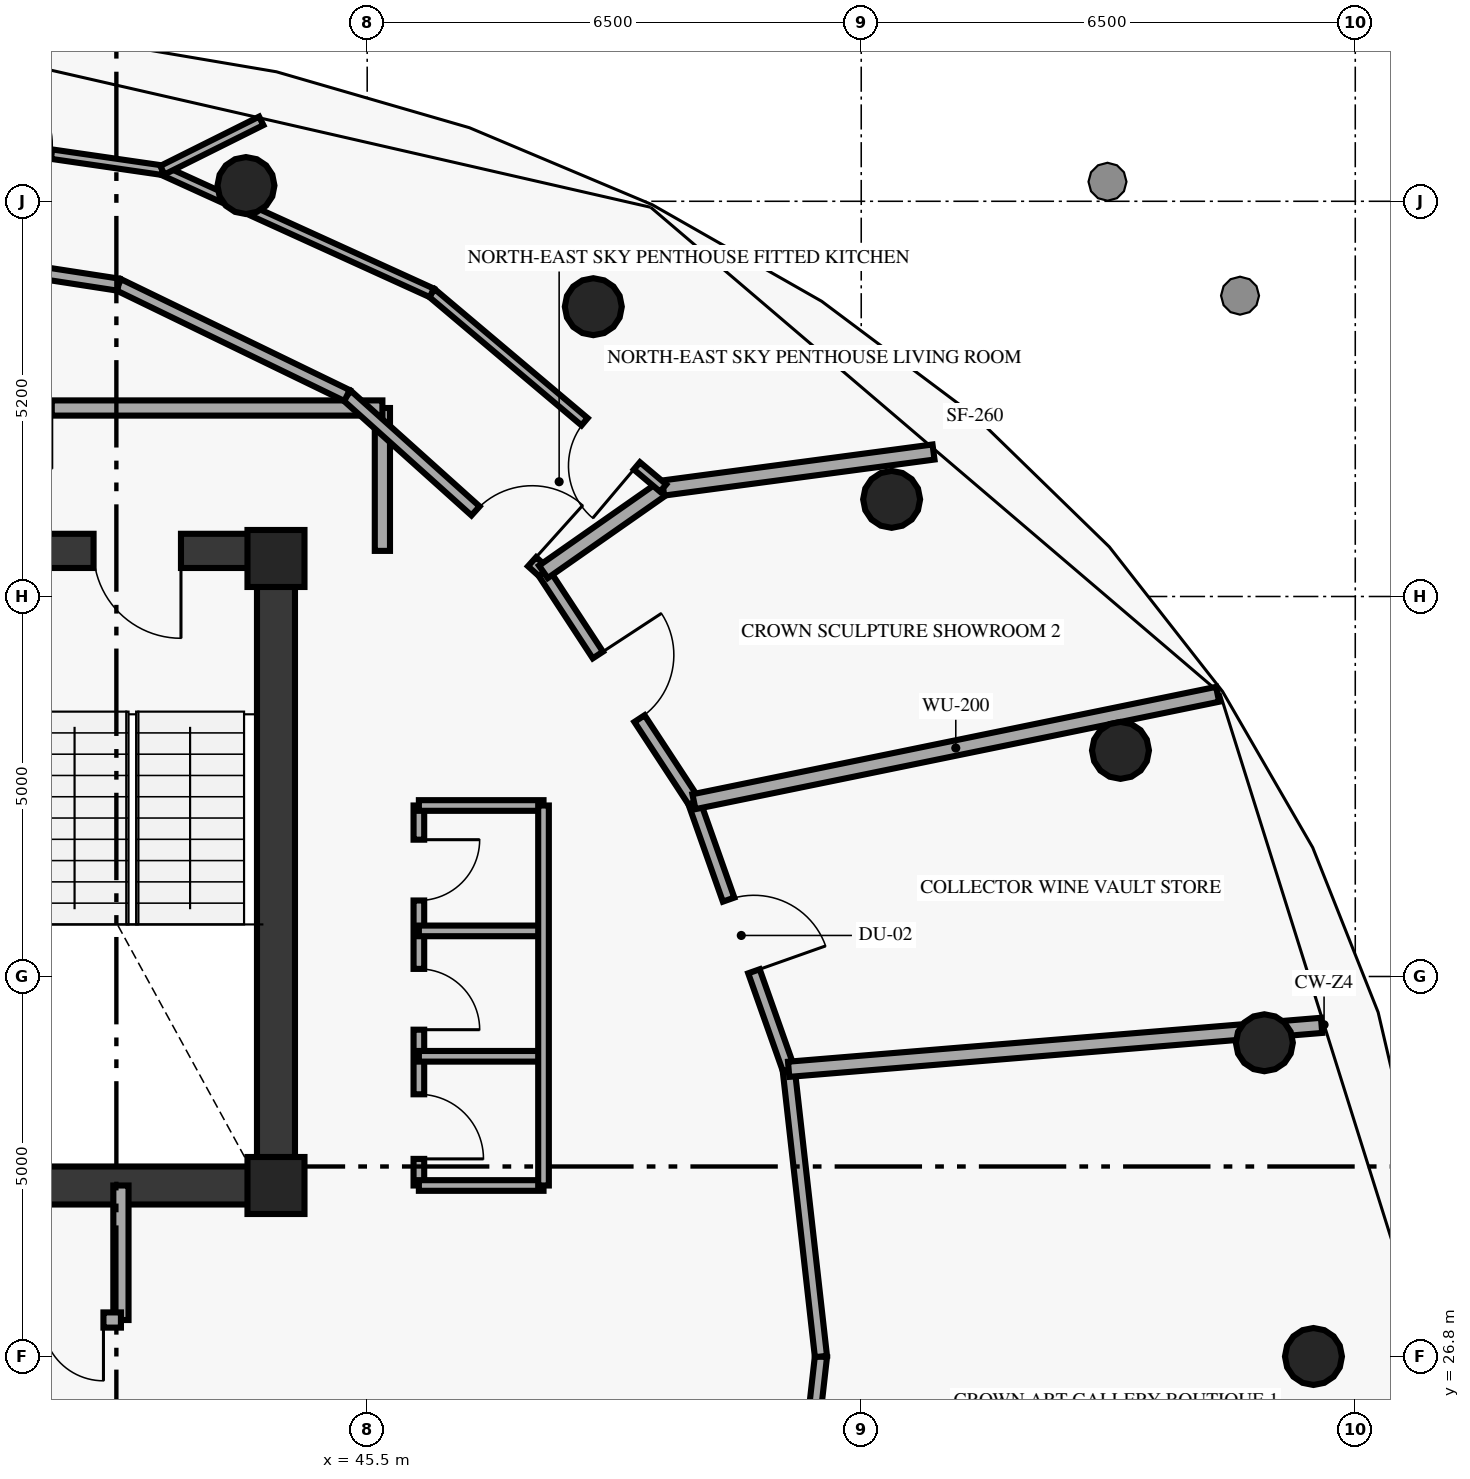
"""IFC4 building model, lengths in metres.
Left out: names, types, materials, properties, quantities, classifications, styles, units other than length and angle.
Written with IfcOpenShell. Run it as: python <this file> out.ifc"""

import sys

from ifc_helpers import new_model, si_unit, direction, frame, frame_2d, origin, origin_2d, place, context, subcontext, project, spatial, rectangle, circle, extrude, element, fill, save


model = new_model("IFC4")
c1 = context("Model", 3, precision=1e-05, world=origin(), true_north=direction((0.0, 1.0)))
c2 = subcontext(c1, "Body", "Model", "MODEL_VIEW")
j1 = project(units=[si_unit("LENGTHUNIT", "METRE"), si_unit("PLANEANGLEUNIT", "RADIAN")], contexts=[c1])
p1 = place(None, origin())
s1 = spatial("IfcSite", under=j1, at=p1, CompositionType="ELEMENT")
p2 = place(p1, origin())
s2 = spatial("IfcBuilding", under=s1, at=p2, CompositionType="ELEMENT")
p3 = place(p2, frame((0.0, 0.0, 255.6)))
s3 = spatial("IfcBuildingStorey", under=s2, at=p3, CompositionType="ELEMENT", Elevation=255.6)
for number, where, z_axis, x_axis in (
    (1, (44.3, 29.05, 0.0), (0.0, 0.0, 1.0), (1.0, 0.0, 0.0)),
    (2, (44.3, 37.3, 0.0), (0.0, 0.0, 1.0), (1.0, 0.0, 0.0)),
):
    element("IfcColumn", number, at=place(p3, frame(where, z_axis=z_axis, x_axis=x_axis)), inside=s3, PredefinedType="PILASTER", context=c2, shape_type="SweptSolid", body=[
        extrude(rectangle(XDim=0.75, YDim=0.75, at=origin_2d()), origin(), (0.0, 0.0, 1.0), 3.54),
    ])
for number, where, z_axis, x_axis in (
    (3, (57.95, 26.8, 0.0), (0.0, 0.0, 1.0), (1.0, 0.0, 0.0)),
    (4, (57.304, 30.928, 0.0), (0.0, 0.0, 1.0), (1.0, 0.0, 0.0)),
    (5, (55.411, 34.775, 0.0), (0.0, 0.0, 1.0), (1.0, 0.0, 0.0)),
    (6, (52.4, 38.078, 0.0), (0.0, 0.0, 1.0), (1.0, 0.0, 0.0)),
    (7, (48.475, 40.613, 0.0), (0.0, 0.0, 1.0), (1.0, 0.0, 0.0)),
    (8, (43.905, 42.207, 0.0), (0.0, 0.0, 1.0), (1.0, 0.0, 0.0)),
):
    element("IfcColumn", number, at=place(p3, frame(where, z_axis=z_axis, x_axis=x_axis)), inside=s3, PredefinedType="COLUMN", context=c2, shape_type="SweptSolid", body=[
        extrude(circle(Radius=0.375, at=origin_2d()), origin(), (0.0, 0.0, 1.0), 3.54),
    ])
p4 = place(p3, frame((44.3, 29.05, 0.0), z_axis=(0.0, 0.0, 1.0), x_axis=(0.0, 1.0, 0.0)))
e9 = element("IfcWall", 9, at=p4, inside=s3, PredefinedType="SHEAR", context=c2, shape_type="SweptSolid", body=[
    extrude(rectangle(XDim=8.35, YDim=0.5, at=frame_2d((4.175, 0.0))), origin(), (0.0, 0.0, 1.0), 3.54),
])
p5 = place(p3, frame((33.7, 29.05, 0.0), z_axis=(0.0, 0.0, 1.0), x_axis=(1.0, 0.0, 0.0)))
e10 = element("IfcWall", 10, at=p5, inside=s3, PredefinedType="SHEAR", context=c2, shape_type="SweptSolid", body=[
    extrude(rectangle(XDim=10.6, YDim=0.5, at=frame_2d((5.3, 0.0))), origin(), (0.0, 0.0, 1.0), 3.54),
])
p6 = place(p3, frame((44.3, 37.4, 0.0), z_axis=(0.0, 0.0, 1.0), x_axis=(-1.0, 0.0, 0.0)))
e11 = element("IfcWall", 11, at=p6, inside=s3, PredefinedType="SHEAR", context=c2, shape_type="SweptSolid", body=[
    extrude(rectangle(XDim=3.65, YDim=0.45, at=frame_2d((1.825, 0.0))), origin(), (0.0, 0.0, 1.0), 3.54),
])
p7 = place(p6, frame((1.25, 0.0, 0.0)))
e12 = element("IfcOpeningElement", 12, at=p7, cuts=e11, PredefinedType="OPENING", context=c2, shape_type="SweptSolid", body=[
    extrude(rectangle(XDim=1.15, YDim=2.15, at=frame_2d((0.575, 1.075))), frame((0.0, 0.235, 0.0), z_axis=(0.0, -1.0, 0.0), x_axis=(1.0, 0.0, 0.0)), (0.0, 0.0, 1.0), 0.47),
])
p8 = place(p3, frame((45.7, 37.4, 0.0), z_axis=(0.0, 0.0, 1.0), x_axis=(0.0, 1.0, 0.0)))
e13 = element("IfcWall", 13, at=p8, inside=s3, PredefinedType="SOLIDWALL", context=c2, shape_type="SweptSolid", body=[
    extrude(rectangle(XDim=1.88, YDim=0.2, at=frame_2d((0.94, 0.0))), origin(), (0.0, 0.0, 1.0), 3.54),
])
p9 = place(p3, frame((45.7, 39.28, 0.0), z_axis=(0.0, 0.0, 1.0), x_axis=(-1.0, 0.0, 0.0)))
e14 = element("IfcWall", 14, at=p9, inside=s3, PredefinedType="SOLIDWALL", context=c2, shape_type="SweptSolid", body=[
    extrude(rectangle(XDim=6.6, YDim=0.2, at=frame_2d((3.3, 0.0))), origin(), (0.0, 0.0, 1.0), 3.54),
])
p10 = place(p9, frame((4.35, 0.0, 0.0)))
e15 = element("IfcOpeningElement", 15, at=p10, cuts=e14, PredefinedType="OPENING", context=c2, shape_type="SweptSolid", body=[
    extrude(rectangle(XDim=1.6, YDim=2.2, at=frame_2d((0.8, 1.1))), frame((0.0, 0.11, 0.0), z_axis=(0.0, -1.0, 0.0), x_axis=(1.0, 0.0, 0.0)), (0.0, 0.0, 1.0), 0.22),
])
p11 = place(p3, frame((42.26, 27.28, 0.0), z_axis=(0.0, 0.0, 1.0), x_axis=(0.0, 1.0, 0.0)))
e16 = element("IfcWall", 16, at=p11, inside=s3, PredefinedType="SOLIDWALL", context=c2, shape_type="SweptSolid", body=[
    extrude(rectangle(XDim=1.77, YDim=0.2, at=frame_2d((0.885, 0.0))), origin(), (0.0, 0.0, 1.0), 3.54),
])
p12 = place(p3, frame((41.0, 27.28, 0.0), z_axis=(0.0, 0.0, 1.0), x_axis=(1.0, 0.0, 0.0)))
e17 = element("IfcWall", 17, at=p12, inside=s3, PredefinedType="SOLIDWALL", context=c2, shape_type="SweptSolid", body=[
    extrude(rectangle(XDim=1.26, YDim=0.2, at=frame_2d((0.63, 0.0))), origin(), (0.0, 0.0, 1.0), 3.54),
])
p13 = place(p12, frame((0.23, 0.0, 0.0)))
e18 = element("IfcOpeningElement", 18, at=p13, cuts=e17, PredefinedType="OPENING", context=c2, shape_type="SweptSolid", body=[
    extrude(rectangle(XDim=0.8, YDim=2.05, at=frame_2d((0.4, 1.025))), frame((0.0, 0.11, 0.0), z_axis=(0.0, -1.0, 0.0), x_axis=(1.0, 0.0, 0.0)), (0.0, 0.0, 1.0), 0.22),
])
p14 = place(p3, frame((46.18, 34.05, 0.0), z_axis=(0.0, 0.0, 1.0), x_axis=(0.0, -1.0, 0.0)))
e19 = element("IfcWall", 19, at=p14, inside=s3, PredefinedType="PARTITIONING", context=c2, shape_type="SweptSolid", body=[
    extrude(rectangle(XDim=5.0, YDim=0.14, at=frame_2d((2.5, 0.0))), origin(), (0.0, 0.0, 1.0), 3.54),
])
p15 = place(p14, frame((3.8, 0.0, 0.0)))
e20 = element("IfcOpeningElement", 20, at=p15, cuts=e19, PredefinedType="OPENING", context=c2, shape_type="SweptSolid", body=[
    extrude(rectangle(XDim=0.85, YDim=2.1, at=frame_2d((0.425, 1.05))), frame((0.0, 0.08, 0.0), z_axis=(0.0, -1.0, 0.0), x_axis=(1.0, 0.0, 0.0)), (0.0, 0.0, 1.0), 0.16),
])
p16 = place(p14, frame((2.15, 0.0, 0.0)))
e21 = element("IfcOpeningElement", 21, at=p16, cuts=e19, PredefinedType="OPENING", context=c2, shape_type="SweptSolid", body=[
    extrude(rectangle(XDim=0.8, YDim=2.05, at=frame_2d((0.4, 1.025))), frame((0.0, 0.08, 0.0), z_axis=(0.0, -1.0, 0.0), x_axis=(1.0, 0.0, 0.0)), (0.0, 0.0, 1.0), 0.16),
])
p17 = place(p14, frame((0.45, 0.0, 0.0)))
e22 = element("IfcOpeningElement", 22, at=p17, cuts=e19, PredefinedType="OPENING", context=c2, shape_type="SweptSolid", body=[
    extrude(rectangle(XDim=0.8, YDim=2.05, at=frame_2d((0.4, 1.025))), frame((0.0, 0.08, 0.0), z_axis=(0.0, -1.0, 0.0), x_axis=(1.0, 0.0, 0.0)), (0.0, 0.0, 1.0), 0.16),
])
for number, where, z_axis, x_axis in (
    (23, (46.18, 29.05, 0.0), (0.0, 0.0, 1.0), (1.0, 0.0, 0.0)),
    (24, (46.18, 30.75, 0.0), (0.0, 0.0, 1.0), (1.0, 0.0, 0.0)),
    (25, (46.18, 32.4, 0.0), (0.0, 0.0, 1.0), (1.0, 0.0, 0.0)),
    (26, (46.18, 34.05, 0.0), (0.0, 0.0, 1.0), (1.0, 0.0, 0.0)),
):
    element("IfcWall", number, at=place(p3, frame(where, z_axis=z_axis, x_axis=x_axis)), inside=s3, PredefinedType="PARTITIONING", context=c2, shape_type="SweptSolid", body=[
        extrude(rectangle(XDim=1.64, YDim=0.14, at=frame_2d((0.82, 0.0))), origin(), (0.0, 0.0, 1.0), 3.54),
    ])
p18 = place(p3, frame((47.82, 29.05, 0.0), z_axis=(0.0, 0.0, 1.0), x_axis=(0.0, 1.0, 0.0)))
e27 = element("IfcWall", 27, at=p18, inside=s3, PredefinedType="PARTITIONING", context=c2, shape_type="SweptSolid", body=[
    extrude(rectangle(XDim=5.0, YDim=0.14, at=frame_2d((2.5, 0.0))), origin(), (0.0, 0.0, 1.0), 3.54),
])
p19 = place(p3, frame((51.47, 26.8, 0.0), z_axis=(0.0, 0.0, 1.0), x_axis=(-0.111770206893, -0.993734079546, 0.0)))
e28 = element("IfcWall", 28, at=p19, inside=s3, PredefinedType="PARTITIONING", context=c2, shape_type="SweptSolid", body=[
    extrude(rectangle(XDim=3.803, YDim=0.16, at=frame_2d((1.901, 0.0))), origin(), (0.0, 0.0, 1.0), 3.54),
])
p20 = place(p19, frame((1.401, 0.0, 0.0)))
e29 = element("IfcOpeningElement", 29, at=p20, cuts=e28, PredefinedType="OPENING", context=c2, shape_type="SweptSolid", body=[
    extrude(rectangle(XDim=1.0, YDim=2.15, at=frame_2d((0.5, 1.075))), frame((0.0, 0.09, 0.0), z_axis=(0.0, -1.0, 0.0), x_axis=(1.0, 0.0, 0.0)), (0.0, 0.0, 1.0), 0.18),
])
p21 = place(p3, frame((51.47, 26.8, 0.0), z_axis=(0.0, 0.0, 1.0), x_axis=(-0.111770206893, 0.993734079546, 0.0)))
e30 = element("IfcWall", 30, at=p21, inside=s3, PredefinedType="PARTITIONING", context=c2, shape_type="SweptSolid", body=[
    extrude(rectangle(XDim=3.803, YDim=0.16, at=frame_2d((1.901, 0.0))), origin(), (0.0, 0.0, 1.0), 3.54),
])
p22 = place(p3, frame((49.799, 34.1, 0.0), z_axis=(0.0, 0.0, 1.0), x_axis=(0.333568819216, -0.942725751662, 0.0)))
e31 = element("IfcWall", 31, at=p22, inside=s3, PredefinedType="PARTITIONING", context=c2, shape_type="SweptSolid", body=[
    extrude(rectangle(XDim=3.735, YDim=0.16, at=frame_2d((1.867, 0.0))), origin(), (0.0, 0.0, 1.0), 3.54),
])
p23 = place(p22, frame((1.367, 0.0, 0.0)))
e32 = element("IfcOpeningElement", 32, at=p23, cuts=e31, PredefinedType="OPENING", context=c2, shape_type="SweptSolid", body=[
    extrude(rectangle(XDim=1.0, YDim=2.15, at=frame_2d((0.5, 1.075))), frame((0.0, 0.09, 0.0), z_axis=(0.0, -1.0, 0.0), x_axis=(1.0, 0.0, 0.0)), (0.0, 0.0, 1.0), 0.18),
])
p24 = place(p3, frame((47.818, 37.124, 0.0), z_axis=(0.0, 0.0, 1.0), x_axis=(0.547980633713, -0.836491019124, 0.0)))
e33 = element("IfcWall", 33, at=p24, inside=s3, PredefinedType="PARTITIONING", context=c2, shape_type="SweptSolid", body=[
    extrude(rectangle(XDim=3.615, YDim=0.16, at=frame_2d((1.808, 0.0))), origin(), (0.0, 0.0, 1.0), 3.54),
])
p25 = place(p24, frame((1.308, 0.0, 0.0)))
e34 = element("IfcOpeningElement", 34, at=p25, cuts=e33, PredefinedType="OPENING", context=c2, shape_type="SweptSolid", body=[
    extrude(rectangle(XDim=1.0, YDim=2.15, at=frame_2d((0.5, 1.075))), frame((0.0, 0.09, 0.0), z_axis=(0.0, -1.0, 0.0), x_axis=(1.0, 0.0, 0.0)), (0.0, 0.0, 1.0), 0.18),
])
p26 = place(p3, frame((45.235, 39.444, 0.0), z_axis=(0.0, 0.0, 1.0), x_axis=(0.743958104357, -0.668226263299, 0.0)))
e35 = element("IfcWall", 35, at=p26, inside=s3, PredefinedType="PARTITIONING", context=c2, shape_type="SweptSolid", body=[
    extrude(rectangle(XDim=3.472, YDim=0.16, at=frame_2d((1.736, 0.0))), origin(), (0.0, 0.0, 1.0), 3.54),
])
p27 = place(p26, frame((2.272, 0.0, 0.0)))
e36 = element("IfcOpeningElement", 36, at=p27, cuts=e35, PredefinedType="OPENING", context=c2, shape_type="SweptSolid", body=[
    extrude(rectangle(XDim=1.0, YDim=2.15, at=frame_2d((0.5, 1.075))), frame((0.0, 0.09, 0.0), z_axis=(0.0, -1.0, 0.0), x_axis=(1.0, 0.0, 0.0)), (0.0, 0.0, 1.0), 0.18),
])
p28 = place(p3, frame((45.235, 39.444, 0.0), z_axis=(0.0, 0.0, 1.0), x_axis=(-0.899751550897, 0.436402505329, 0.0)))
e37 = element("IfcWall", 37, at=p28, inside=s3, PredefinedType="PARTITIONING", context=c2, shape_type="SweptSolid", body=[
    extrude(rectangle(XDim=3.343, YDim=0.16, at=frame_2d((1.672, 0.0))), origin(), (0.0, 0.0, 1.0), 3.54),
])
p29 = place(p3, frame((42.227, 40.903, 0.0), z_axis=(0.0, 0.0, 1.0), x_axis=(-0.988355267662, 0.152163940815, 0.0)))
e38 = element("IfcWall", 38, at=p29, inside=s3, PredefinedType="PARTITIONING", context=c2, shape_type="SweptSolid", body=[
    extrude(rectangle(XDim=3.265, YDim=0.16, at=frame_2d((1.633, 0.0))), origin(), (0.0, 0.0, 1.0), 3.54),
])
p30 = place(p3, frame((51.045, 30.579, 0.0), z_axis=(0.0, 0.0, 1.0), x_axis=(0.996622662383, 0.082117408774, 0.0)))
e39 = element("IfcWall", 39, at=p30, inside=s3, PredefinedType="PARTITIONING", context=c2, shape_type="SweptSolid", body=[
    extrude(rectangle(XDim=6.27, YDim=0.2, at=frame_2d((3.135, 0.0))), origin(), (0.0, 0.0, 1.0), 3.54),
])
p31 = place(p3, frame((57.294, 31.094, 0.0), z_axis=(0.0, 0.0, 1.0), x_axis=(0.996609247306, 0.082280059458, 0.0)))
e40 = element("IfcWall", 40, at=p31, inside=s3, PredefinedType="PARTITIONING", context=c2, shape_type="SweptSolid", body=[
    extrude(rectangle(XDim=0.766, YDim=0.2, at=frame_2d((0.383, 0.0))), origin(), (0.0, 0.0, 1.0), 2.925),
])
p32 = place(p3, frame((49.799, 34.1, 0.0), z_axis=(0.0, 0.0, 1.0), x_axis=(0.97961583885, 0.200880084314, 0.0)))
e41 = element("IfcWall", 41, at=p32, inside=s3, PredefinedType="PARTITIONING", context=c2, shape_type="SweptSolid", body=[
    extrude(rectangle(XDim=7.033, YDim=0.2, at=frame_2d((3.517, 0.0))), origin(), (0.0, 0.0, 1.0), 3.54),
])
p33 = place(p3, frame((47.818, 37.124, 0.0), z_axis=(0.0, 0.0, 1.0), x_axis=(0.819261732585, 0.573419753341, 0.0)))
e42 = element("IfcWall", 42, at=p33, inside=s3, PredefinedType="PARTITIONING", context=c2, shape_type="SweptSolid", body=[
    extrude(rectangle(XDim=1.924, YDim=0.2, at=frame_2d((0.962, 0.0))), origin(), (0.0, 0.0, 1.0), 3.54),
])
p34 = place(p3, frame((49.394, 38.227, 0.0), z_axis=(0.0, 0.0, 1.0), x_axis=(0.991241562349, 0.13206121714, 0.0)))
e43 = element("IfcWall", 43, at=p34, inside=s3, PredefinedType="PARTITIONING", context=c2, shape_type="SweptSolid", body=[
    extrude(rectangle(XDim=3.588, YDim=0.2, at=frame_2d((1.794, 0.0))), origin(), (0.0, 0.0, 1.0), 3.54),
])
p35 = place(p3, frame((46.35, 40.795, 0.0), z_axis=(0.0, 0.0, 1.0), x_axis=(0.764348134159, -0.644803791713, 0.0)))
e44 = element("IfcWall", 44, at=p35, inside=s3, PredefinedType="PARTITIONING", context=c2, shape_type="SweptSolid", body=[
    extrude(rectangle(XDim=3.982, YDim=0.125, at=frame_2d((1.991, 0.0))), origin(), (0.0, 0.0, 1.0), 3.54),
])
p36 = place(p35, frame((2.63, 0.0, 0.0)))
e45 = element("IfcOpeningElement", 45, at=p36, cuts=e44, PredefinedType="OPENING", context=c2, shape_type="SweptSolid", body=[
    extrude(rectangle(XDim=0.9, YDim=2.1, at=frame_2d((0.45, 1.05))), frame((0.0, 0.073, 0.0), z_axis=(0.0, -1.0, 0.0), x_axis=(1.0, 0.0, 0.0)), (0.0, 0.0, 1.0), 0.145),
])
p37 = place(p3, frame((46.35, 40.795, 0.0), z_axis=(0.0, 0.0, 1.0), x_axis=(-0.910117326054, 0.414350639938, 0.0)))
e46 = element("IfcWall", 46, at=p37, inside=s3, PredefinedType="PARTITIONING", context=c2, shape_type="SweptSolid", body=[
    extrude(rectangle(XDim=3.895, YDim=0.125, at=frame_2d((1.948, 0.0))), origin(), (0.0, 0.0, 1.0), 3.54),
])
p38 = place(p3, frame((40.217, 42.784, 0.0), z_axis=(0.0, 0.0, 1.0), x_axis=(0.989663671869, -0.143407867924, 0.0)))
e47 = element("IfcWall", 47, at=p38, inside=s3, PredefinedType="PARTITIONING", context=c2, shape_type="SweptSolid", body=[
    extrude(rectangle(XDim=2.615, YDim=0.125, at=frame_2d((1.308, 0.0))), origin(), (0.0, 0.0, 1.0), 3.0),
])
p39 = place(p38, frame((0.242, 0.0, 0.0)))
e48 = element("IfcOpeningElement", 48, at=p39, cuts=e47, PredefinedType="OPENING", context=c2, shape_type="SweptSolid", body=[
    extrude(rectangle(XDim=0.9, YDim=2.1, at=frame_2d((0.45, 1.05))), frame((0.0, 0.073, 0.0), z_axis=(0.0, -1.0, 0.0), x_axis=(1.0, 0.0, 0.0)), (0.0, 0.0, 1.0), 0.145),
])
p40 = place(p3, frame((42.805, 42.409, 0.0), z_axis=(0.0, 0.0, 1.0), x_axis=(0.894796289478, 0.446474635714, 0.0)))
e49 = element("IfcWall", 49, at=p40, inside=s3, PredefinedType="PARTITIONING", context=c2, shape_type="SweptSolid", body=[
    extrude(rectangle(XDim=1.454, YDim=0.125, at=frame_2d((0.727, 0.0))), origin(), (0.0, 0.0, 1.0), 3.54),
])
p41 = place(p7, origin())
e50 = element("IfcDoor", 50, at=p41, inside=s3, OperationType="SINGLE_SWING_LEFT", PredefinedType="DOOR", context=c2, shape_type="SweptSolid", body=[
    extrude(rectangle(XDim=1.15, YDim=2.15, at=frame_2d((0.575, 1.075))), frame((0.0, 0.025, 0.0), z_axis=(0.0, -1.0, 0.0), x_axis=(1.0, 0.0, 0.0)), (0.0, 0.0, 1.0), 0.05),
])
fill(e12, e50)
p42 = place(p13, origin())
e51 = element("IfcDoor", 51, at=p42, inside=s3, OperationType="SINGLE_SWING_RIGHT", PredefinedType="DOOR", context=c2, shape_type="SweptSolid", body=[
    extrude(rectangle(XDim=0.8, YDim=2.05, at=frame_2d((0.4, 1.025))), frame((0.0, 0.025, 0.0), z_axis=(0.0, -1.0, 0.0), x_axis=(1.0, 0.0, 0.0)), (0.0, 0.0, 1.0), 0.05),
])
fill(e18, e51)
p43 = place(p15, origin())
e52 = element("IfcDoor", 52, at=p43, inside=s3, OperationType="SINGLE_SWING_RIGHT", PredefinedType="DOOR", context=c2, shape_type="SweptSolid", body=[
    extrude(rectangle(XDim=0.85, YDim=2.1, at=frame_2d((0.425, 1.05))), frame((0.0, 0.025, 0.0), z_axis=(0.0, -1.0, 0.0), x_axis=(1.0, 0.0, 0.0)), (0.0, 0.0, 1.0), 0.05),
])
fill(e20, e52)
p44 = place(p16, origin())
e53 = element("IfcDoor", 53, at=p44, inside=s3, OperationType="SINGLE_SWING_RIGHT", PredefinedType="DOOR", context=c2, shape_type="SweptSolid", body=[
    extrude(rectangle(XDim=0.8, YDim=2.05, at=frame_2d((0.4, 1.025))), frame((0.0, 0.025, 0.0), z_axis=(0.0, -1.0, 0.0), x_axis=(1.0, 0.0, 0.0)), (0.0, 0.0, 1.0), 0.05),
])
fill(e21, e53)
p45 = place(p17, origin())
e54 = element("IfcDoor", 54, at=p45, inside=s3, OperationType="SINGLE_SWING_LEFT", PredefinedType="DOOR", context=c2, shape_type="SweptSolid", body=[
    extrude(rectangle(XDim=0.8, YDim=2.05, at=frame_2d((0.4, 1.025))), frame((0.0, 0.025, 0.0), z_axis=(0.0, -1.0, 0.0), x_axis=(1.0, 0.0, 0.0)), (0.0, 0.0, 1.0), 0.05),
])
fill(e22, e54)
p46 = place(p23, origin())
e55 = element("IfcDoor", 55, at=p46, inside=s3, OperationType="SINGLE_SWING_RIGHT", PredefinedType="DOOR", context=c2, shape_type="SweptSolid", body=[
    extrude(rectangle(XDim=1.0, YDim=2.15, at=frame_2d((0.5, 1.075))), frame((0.0, 0.025, 0.0), z_axis=(0.0, -1.0, 0.0), x_axis=(1.0, 0.0, 0.0)), (0.0, 0.0, 1.0), 0.05),
])
fill(e32, e55)
p47 = place(p25, origin())
e56 = element("IfcDoor", 56, at=p47, inside=s3, OperationType="SINGLE_SWING_LEFT", PredefinedType="DOOR", context=c2, shape_type="SweptSolid", body=[
    extrude(rectangle(XDim=1.0, YDim=2.15, at=frame_2d((0.5, 1.075))), frame((0.0, 0.025, 0.0), z_axis=(0.0, -1.0, 0.0), x_axis=(1.0, 0.0, 0.0)), (0.0, 0.0, 1.0), 0.05),
])
fill(e34, e56)
p48 = place(p27, origin())
e57 = element("IfcDoor", 57, at=p48, inside=s3, OperationType="SINGLE_SWING_RIGHT", PredefinedType="DOOR", context=c2, shape_type="SweptSolid", body=[
    extrude(rectangle(XDim=1.0, YDim=2.15, at=frame_2d((0.5, 1.075))), frame((0.0, 0.025, 0.0), z_axis=(0.0, -1.0, 0.0), x_axis=(1.0, 0.0, 0.0)), (0.0, 0.0, 1.0), 0.05),
])
fill(e36, e57)
p49 = place(p36, origin())
e58 = element("IfcDoor", 58, at=p49, inside=s3, OperationType="SINGLE_SWING_RIGHT", PredefinedType="DOOR", context=c2, shape_type="SweptSolid", body=[
    extrude(rectangle(XDim=0.9, YDim=2.1, at=frame_2d((0.45, 1.05))), frame((0.0, 0.025, 0.0), z_axis=(0.0, -1.0, 0.0), x_axis=(1.0, 0.0, 0.0)), (0.0, 0.0, 1.0), 0.05),
])
fill(e45, e58)
p50 = place(p39, origin())
e59 = element("IfcDoor", 59, at=p50, inside=s3, OperationType="SINGLE_SWING_LEFT", PredefinedType="DOOR", context=c2, shape_type="SweptSolid", body=[
    extrude(rectangle(XDim=0.9, YDim=2.1, at=frame_2d((0.45, 1.05))), frame((0.0, 0.025, 0.0), z_axis=(0.0, -1.0, 0.0), x_axis=(1.0, 0.0, 0.0)), (0.0, 0.0, 1.0), 0.05),
])
fill(e48, e59)
save(model, sys.argv[1])
